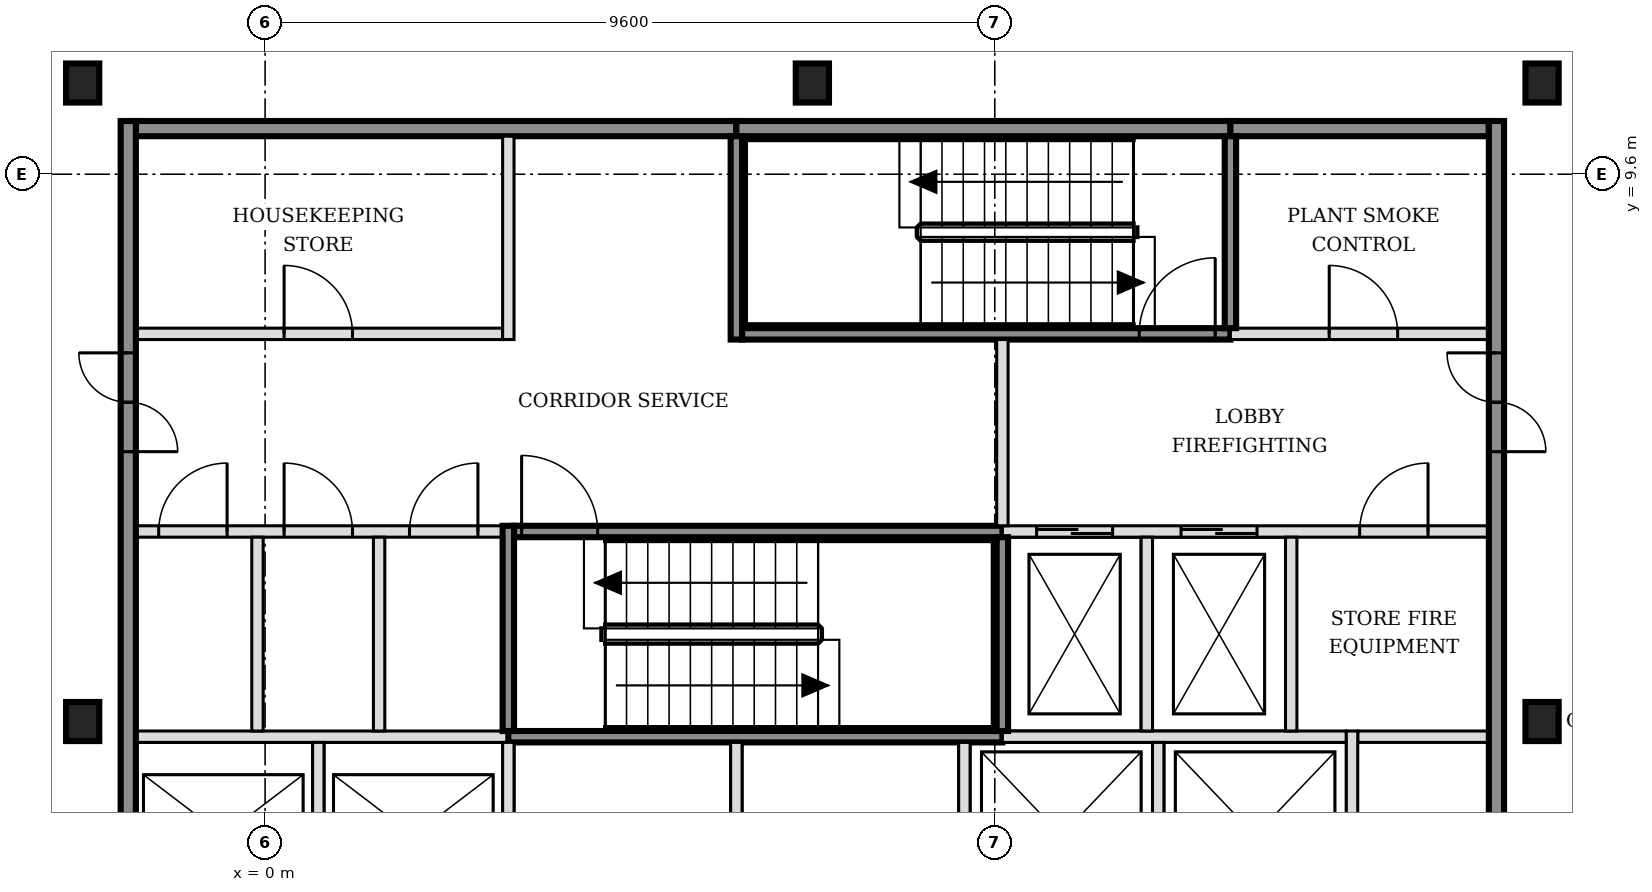
"""IFC4 building model, lengths in metres.
Left out: names, types, materials, properties, quantities, classifications, styles, units other than length and angle.
Written with IfcOpenShell. Run it as: python <this file> out.ifc"""

import sys

from ifc_helpers import new_model, si_unit, direction, frame, frame_2d, origin, origin_2d, place, context, subcontext, project, spatial, rectangle, i_section, extrude, element, fill, save


model = new_model("IFC4")
c1 = context("Model", 3, precision=1e-05, world=origin(), true_north=direction((0.0, 1.0)))
c2 = subcontext(c1, "Body", "Model", "MODEL_VIEW")
j1 = project(units=[si_unit("LENGTHUNIT", "METRE"), si_unit("PLANEANGLEUNIT", "RADIAN")], contexts=[c1])
p1 = place(None, origin())
s1 = spatial("IfcSite", under=j1, at=p1, CompositionType="ELEMENT")
p2 = place(p1, origin())
s2 = spatial("IfcBuilding", under=s1, at=p2, CompositionType="ELEMENT")
p3 = place(p2, frame((0.0, 0.0, 90.6)))
s3 = spatial("IfcBuildingStorey", under=s2, at=p3, CompositionType="ELEMENT", Elevation=90.6)
for number, where, z_axis, x_axis in (
    (1, (-2.4, 2.4, -0.15), (0.0, 0.0, 1.0), (1.0, 0.0, 0.0)),
    (2, (16.8, 2.4, -0.15), (0.0, 0.0, 1.0), (1.0, 0.0, 0.0)),
    (3, (-2.4, 10.8, -0.15), (0.0, 0.0, 1.0), (1.0, 0.0, 0.0)),
    (4, (7.2, 10.8, -0.15), (0.0, 0.0, 1.0), (1.0, 0.0, 0.0)),
    (5, (16.8, 10.8, -0.15), (0.0, 0.0, 1.0), (1.0, 0.0, 0.0)),
):
    element("IfcColumn", number, at=place(p3, frame(where, z_axis=z_axis, x_axis=x_axis)), inside=s3, PredefinedType="COLUMN", context=c2, shape_type="SweptSolid", body=[
        extrude(i_section(OverallWidth=0.437, OverallDepth=0.514, WebThickness=0.061, FlangeThickness=0.097, FilletRadius=0.015, at=origin_2d()), origin(), (0.0, 0.0, 1.0), 3.6),
    ])
p4 = place(p3, frame((-1.7, 2.2, 0.0), z_axis=(0.0, 0.0, 1.0), x_axis=(1.0, 0.0, 0.0)))
e6 = element("IfcWall", 6, at=p4, inside=s3, PredefinedType="SOLIDWALL", context=c2, shape_type="SweptSolid", body=[
    extrude(rectangle(XDim=4.9, YDim=0.15, at=frame_2d((2.45, 0.0))), origin(), (0.0, 0.0, 1.0), 3.45),
])
p5 = place(p3, frame((3.2, 2.2, 0.0), z_axis=(0.0, 0.0, 1.0), x_axis=(1.0, 0.0, 0.0)))
e7 = element("IfcWall", 7, at=p5, inside=s3, PredefinedType="SOLIDWALL", context=c2, shape_type="SweptSolid", body=[
    extrude(rectangle(XDim=6.5, YDim=0.15, at=frame_2d((3.25, 0.0))), origin(), (0.0, 0.0, 1.0), 3.45),
])
p6 = place(p3, frame((9.7, 2.2, 0.0), z_axis=(0.0, 0.0, 1.0), x_axis=(1.0, 0.0, 0.0)))
e8 = element("IfcWall", 8, at=p6, inside=s3, PredefinedType="SOLIDWALL", context=c2, shape_type="SweptSolid", body=[
    extrude(rectangle(XDim=4.525, YDim=0.15, at=frame_2d((2.263, 0.0))), origin(), (0.0, 0.0, 1.0), 3.45),
])
p7 = place(p3, frame((14.375, 2.2, 0.0), z_axis=(0.0, 0.0, 1.0), x_axis=(1.0, 0.0, 0.0)))
e9 = element("IfcWall", 9, at=p7, inside=s3, PredefinedType="PARTITIONING", context=c2, shape_type="SweptSolid", body=[
    extrude(rectangle(XDim=1.725, YDim=0.15, at=frame_2d((0.863, 0.0))), origin(), (0.0, 0.0, 1.0), 3.45),
])
p8 = place(p3, frame((-1.7, 4.9, 0.0), z_axis=(0.0, 0.0, 1.0), x_axis=(1.0, 0.0, 0.0)))
e10 = element("IfcWall", 10, at=p8, inside=s3, PredefinedType="PARTITIONING", context=c2, shape_type="SweptSolid", body=[
    extrude(rectangle(XDim=4.825, YDim=0.15, at=frame_2d((2.413, 0.0))), origin(), (0.0, 0.0, 1.0), 3.45),
])
p9 = place(p8, frame((0.3, 0.0, 0.0)))
e11 = element("IfcOpeningElement", 11, at=p9, cuts=e10, PredefinedType="OPENING", context=c2, shape_type="SweptSolid", body=[
    extrude(rectangle(XDim=0.9, YDim=2.1, at=frame_2d((0.45, 1.05))), frame((0.0, 0.085, 0.0), z_axis=(0.0, -1.0, 0.0), x_axis=(1.0, 0.0, 0.0)), (0.0, 0.0, 1.0), 0.17),
])
p10 = place(p8, frame((1.95, 0.0, 0.0)))
e12 = element("IfcOpeningElement", 12, at=p10, cuts=e10, PredefinedType="OPENING", context=c2, shape_type="SweptSolid", body=[
    extrude(rectangle(XDim=0.9, YDim=2.1, at=frame_2d((0.45, 1.05))), frame((0.0, 0.085, 0.0), z_axis=(0.0, -1.0, 0.0), x_axis=(1.0, 0.0, 0.0)), (0.0, 0.0, 1.0), 0.17),
])
p11 = place(p8, frame((3.6, 0.0, 0.0)))
e13 = element("IfcOpeningElement", 13, at=p11, cuts=e10, PredefinedType="OPENING", context=c2, shape_type="SweptSolid", body=[
    extrude(rectangle(XDim=0.9, YDim=2.1, at=frame_2d((0.45, 1.05))), frame((0.0, 0.085, 0.0), z_axis=(0.0, -1.0, 0.0), x_axis=(1.0, 0.0, 0.0)), (0.0, 0.0, 1.0), 0.17),
])
p12 = place(p3, frame((3.275, 4.9, 0.0), z_axis=(0.0, 0.0, 1.0), x_axis=(1.0, 0.0, 0.0)))
e14 = element("IfcWall", 14, at=p12, inside=s3, PredefinedType="SOLIDWALL", context=c2, shape_type="SweptSolid", body=[
    extrude(rectangle(XDim=6.425, YDim=0.15, at=frame_2d((3.212, 0.0))), origin(), (0.0, 0.0, 1.0), 3.45),
])
p13 = place(p12, frame((0.1, 0.0, 0.0)))
e15 = element("IfcOpeningElement", 15, at=p13, cuts=e14, PredefinedType="OPENING", context=c2, shape_type="SweptSolid", body=[
    extrude(rectangle(XDim=1.0, YDim=2.1, at=frame_2d((0.5, 1.05))), frame((0.0, 0.085, 0.0), z_axis=(0.0, -1.0, 0.0), x_axis=(1.0, 0.0, 0.0)), (0.0, 0.0, 1.0), 0.17),
])
p14 = place(p3, frame((9.7, 4.9, 0.0), z_axis=(0.0, 0.0, 1.0), x_axis=(1.0, 0.0, 0.0)))
e16 = element("IfcWall", 16, at=p14, inside=s3, PredefinedType="SOLIDWALL", context=c2, shape_type="SweptSolid", body=[
    extrude(rectangle(XDim=6.4, YDim=0.15, at=frame_2d((3.2, 0.0))), origin(), (0.0, 0.0, 1.0), 3.45),
])
p15 = place(p14, frame((0.45, 0.0, 0.0)))
e17 = element("IfcOpeningElement", 17, at=p15, cuts=e16, PredefinedType="OPENING", context=c2, shape_type="SweptSolid", body=[
    extrude(rectangle(XDim=1.0, YDim=2.1, at=frame_2d((0.5, 1.05))), frame((0.0, 0.085, 0.0), z_axis=(0.0, -1.0, 0.0), x_axis=(1.0, 0.0, 0.0)), (0.0, 0.0, 1.0), 0.17),
])
p16 = place(p14, frame((2.35, 0.0, 0.0)))
e18 = element("IfcOpeningElement", 18, at=p16, cuts=e16, PredefinedType="OPENING", context=c2, shape_type="SweptSolid", body=[
    extrude(rectangle(XDim=1.0, YDim=2.1, at=frame_2d((0.5, 1.05))), frame((0.0, 0.085, 0.0), z_axis=(0.0, -1.0, 0.0), x_axis=(1.0, 0.0, 0.0)), (0.0, 0.0, 1.0), 0.17),
])
p17 = place(p14, frame((4.7, 0.0, 0.0)))
e19 = element("IfcOpeningElement", 19, at=p17, cuts=e16, PredefinedType="OPENING", context=c2, shape_type="SweptSolid", body=[
    extrude(rectangle(XDim=0.9, YDim=2.1, at=frame_2d((0.45, 1.05))), frame((0.0, 0.085, 0.0), z_axis=(0.0, -1.0, 0.0), x_axis=(1.0, 0.0, 0.0)), (0.0, 0.0, 1.0), 0.17),
])
p18 = place(p3, frame((-1.7, 7.5, 0.0), z_axis=(0.0, 0.0, 1.0), x_axis=(1.0, 0.0, 0.0)))
e20 = element("IfcWall", 20, at=p18, inside=s3, PredefinedType="PARTITIONING", context=c2, shape_type="SweptSolid", body=[
    extrude(rectangle(XDim=4.825, YDim=0.15, at=frame_2d((2.413, 0.0))), origin(), (0.0, 0.0, 1.0), 3.45),
])
p19 = place(p18, frame((1.95, 0.0, 0.0)))
e21 = element("IfcOpeningElement", 21, at=p19, cuts=e20, PredefinedType="OPENING", context=c2, shape_type="SweptSolid", body=[
    extrude(rectangle(XDim=0.9, YDim=2.1, at=frame_2d((0.45, 1.05))), frame((0.0, 0.085, 0.0), z_axis=(0.0, -1.0, 0.0), x_axis=(1.0, 0.0, 0.0)), (0.0, 0.0, 1.0), 0.17),
])
p20 = place(p3, frame((6.275, 7.5, 0.0), z_axis=(0.0, 0.0, 1.0), x_axis=(1.0, 0.0, 0.0)))
e22 = element("IfcWall", 22, at=p20, inside=s3, PredefinedType="SOLIDWALL", context=c2, shape_type="SweptSolid", body=[
    extrude(rectangle(XDim=6.425, YDim=0.15, at=frame_2d((3.212, 0.0))), origin(), (0.0, 0.0, 1.0), 3.45),
])
p21 = place(p20, frame((5.225, 0.0, 0.0)))
e23 = element("IfcOpeningElement", 23, at=p21, cuts=e22, PredefinedType="OPENING", context=c2, shape_type="SweptSolid", body=[
    extrude(rectangle(XDim=1.0, YDim=2.1, at=frame_2d((0.5, 1.05))), frame((0.0, 0.085, 0.0), z_axis=(0.0, -1.0, 0.0), x_axis=(1.0, 0.0, 0.0)), (0.0, 0.0, 1.0), 0.17),
])
p22 = place(p3, frame((12.7, 7.5, 0.0), z_axis=(0.0, 0.0, 1.0), x_axis=(1.0, 0.0, 0.0)))
e24 = element("IfcWall", 24, at=p22, inside=s3, PredefinedType="SOLIDWALL", context=c2, shape_type="SweptSolid", body=[
    extrude(rectangle(XDim=3.4, YDim=0.15, at=frame_2d((1.7, 0.0))), origin(), (0.0, 0.0, 1.0), 3.45),
])
p23 = place(p22, frame((1.3, 0.0, 0.0)))
e25 = element("IfcOpeningElement", 25, at=p23, cuts=e24, PredefinedType="OPENING", context=c2, shape_type="SweptSolid", body=[
    extrude(rectangle(XDim=0.9, YDim=2.1, at=frame_2d((0.45, 1.05))), frame((0.0, 0.085, 0.0), z_axis=(0.0, -1.0, 0.0), x_axis=(1.0, 0.0, 0.0)), (0.0, 0.0, 1.0), 0.17),
])
p24 = place(p3, frame((-1.7, 10.2, 0.0), z_axis=(0.0, 0.0, 1.0), x_axis=(1.0, 0.0, 0.0)))
e26 = element("IfcWall", 26, at=p24, inside=s3, PredefinedType="SOLIDWALL", context=c2, shape_type="SweptSolid", body=[
    extrude(rectangle(XDim=7.9, YDim=0.2, at=frame_2d((3.95, 0.0))), origin(), (0.0, 0.0, 1.0), 3.45),
])
p25 = place(p3, frame((6.2, 10.2, 0.0), z_axis=(0.0, 0.0, 1.0), x_axis=(1.0, 0.0, 0.0)))
e27 = element("IfcWall", 27, at=p25, inside=s3, PredefinedType="SOLIDWALL", context=c2, shape_type="SweptSolid", body=[
    extrude(rectangle(XDim=6.5, YDim=0.2, at=frame_2d((3.25, 0.0))), origin(), (0.0, 0.0, 1.0), 3.45),
])
p26 = place(p3, frame((12.7, 10.2, 0.0), z_axis=(0.0, 0.0, 1.0), x_axis=(1.0, 0.0, 0.0)))
e28 = element("IfcWall", 28, at=p26, inside=s3, PredefinedType="SOLIDWALL", context=c2, shape_type="SweptSolid", body=[
    extrude(rectangle(XDim=3.4, YDim=0.2, at=frame_2d((1.7, 0.0))), origin(), (0.0, 0.0, 1.0), 3.45),
])
p27 = place(p3, frame((-1.8, -5.5, 0.0), z_axis=(0.0, 0.0, 1.0), x_axis=(0.0, 1.0, 0.0)))
e29 = element("IfcWall", 29, at=p27, inside=s3, PredefinedType="SOLIDWALL", context=c2, shape_type="SweptSolid", body=[
    extrude(rectangle(XDim=15.8, YDim=0.2, at=frame_2d((7.9, 0.0))), origin(), (0.0, 0.0, 1.0), 3.45),
])
p28 = place(p27, frame((3.05, 0.0, 0.0)))
e30 = element("IfcOpeningElement", 30, at=p28, cuts=e29, PredefinedType="OPENING", context=c2, shape_type="SweptSolid", body=[
    extrude(rectangle(XDim=1.3, YDim=2.1, at=frame_2d((0.65, 1.05))), frame((0.0, 0.11, 0.0), z_axis=(0.0, -1.0, 0.0), x_axis=(1.0, 0.0, 0.0)), (0.0, 0.0, 1.0), 0.22),
])
p29 = place(p27, frame((11.45, 0.0, 0.0)))
e31 = element("IfcOpeningElement", 31, at=p29, cuts=e29, PredefinedType="OPENING", context=c2, shape_type="SweptSolid", body=[
    extrude(rectangle(XDim=1.3, YDim=2.1, at=frame_2d((0.65, 1.05))), frame((0.0, 0.11, 0.0), z_axis=(0.0, -1.0, 0.0), x_axis=(1.0, 0.0, 0.0)), (0.0, 0.0, 1.0), 0.22),
])
p30 = place(p3, frame((-0.1, 2.275, 0.0), z_axis=(0.0, 0.0, 1.0), x_axis=(0.0, 1.0, 0.0)))
e32 = element("IfcWall", 32, at=p30, inside=s3, PredefinedType="PARTITIONING", context=c2, shape_type="SweptSolid", body=[
    extrude(rectangle(XDim=2.55, YDim=0.15, at=frame_2d((1.275, 0.0))), origin(), (0.0, 0.0, 1.0), 3.45),
])
p31 = place(p3, frame((0.7, -0.325, 0.0), z_axis=(0.0, 0.0, 1.0), x_axis=(0.0, 1.0, 0.0)))
e33 = element("IfcWall", 33, at=p31, inside=s3, PredefinedType="SOLIDWALL", context=c2, shape_type="SweptSolid", body=[
    extrude(rectangle(XDim=2.45, YDim=0.15, at=frame_2d((1.225, 0.0))), origin(), (0.0, 0.0, 1.0), 3.45),
])
p32 = place(p3, frame((1.5, 2.275, 0.0), z_axis=(0.0, 0.0, 1.0), x_axis=(0.0, 1.0, 0.0)))
e34 = element("IfcWall", 34, at=p32, inside=s3, PredefinedType="PARTITIONING", context=c2, shape_type="SweptSolid", body=[
    extrude(rectangle(XDim=2.55, YDim=0.15, at=frame_2d((1.275, 0.0))), origin(), (0.0, 0.0, 1.0), 3.45),
])
p33 = place(p3, frame((3.2, -0.325, 0.0), z_axis=(0.0, 0.0, 1.0), x_axis=(0.0, 1.0, 0.0)))
e35 = element("IfcWall", 35, at=p33, inside=s3, PredefinedType="SOLIDWALL", context=c2, shape_type="SweptSolid", body=[
    extrude(rectangle(XDim=2.45, YDim=0.15, at=frame_2d((1.225, 0.0))), origin(), (0.0, 0.0, 1.0), 3.45),
])
p34 = place(p3, frame((3.2, 2.275, 0.0), z_axis=(0.0, 0.0, 1.0), x_axis=(0.0, 1.0, 0.0)))
e36 = element("IfcWall", 36, at=p34, inside=s3, PredefinedType="SOLIDWALL", context=c2, shape_type="SweptSolid", body=[
    extrude(rectangle(XDim=2.7, YDim=0.15, at=frame_2d((1.35, 0.0))), origin(), (0.0, 0.0, 1.0), 3.45),
])
p35 = place(p3, frame((3.2, 7.425, 0.0), z_axis=(0.0, 0.0, 1.0), x_axis=(0.0, 1.0, 0.0)))
e37 = element("IfcWall", 37, at=p35, inside=s3, PredefinedType="PARTITIONING", context=c2, shape_type="SweptSolid", body=[
    extrude(rectangle(XDim=2.675, YDim=0.15, at=frame_2d((1.337, 0.0))), origin(), (0.0, 0.0, 1.0), 3.45),
])
p36 = place(p3, frame((6.2, -0.325, 0.0), z_axis=(0.0, 0.0, 1.0), x_axis=(0.0, 1.0, 0.0)))
e38 = element("IfcWall", 38, at=p36, inside=s3, PredefinedType="SOLIDWALL", context=c2, shape_type="SweptSolid", body=[
    extrude(rectangle(XDim=2.45, YDim=0.15, at=frame_2d((1.225, 0.0))), origin(), (0.0, 0.0, 1.0), 3.45),
])
p37 = place(p3, frame((6.2, 7.425, 0.0), z_axis=(0.0, 0.0, 1.0), x_axis=(0.0, 1.0, 0.0)))
e39 = element("IfcWall", 39, at=p37, inside=s3, PredefinedType="SOLIDWALL", context=c2, shape_type="SweptSolid", body=[
    extrude(rectangle(XDim=2.675, YDim=0.15, at=frame_2d((1.337, 0.0))), origin(), (0.0, 0.0, 1.0), 3.45),
])
p38 = place(p3, frame((9.2, -0.325, 0.0), z_axis=(0.0, 0.0, 1.0), x_axis=(0.0, 1.0, 0.0)))
e40 = element("IfcWall", 40, at=p38, inside=s3, PredefinedType="SOLIDWALL", context=c2, shape_type="SweptSolid", body=[
    extrude(rectangle(XDim=2.45, YDim=0.15, at=frame_2d((1.225, 0.0))), origin(), (0.0, 0.0, 1.0), 3.45),
])
p39 = place(p3, frame((9.7, 2.275, 0.0), z_axis=(0.0, 0.0, 1.0), x_axis=(0.0, 1.0, 0.0)))
e41 = element("IfcWall", 41, at=p39, inside=s3, PredefinedType="SOLIDWALL", context=c2, shape_type="SweptSolid", body=[
    extrude(rectangle(XDim=2.55, YDim=0.15, at=frame_2d((1.275, 0.0))), origin(), (0.0, 0.0, 1.0), 3.45),
])
p40 = place(p3, frame((9.7, 4.975, 0.0), z_axis=(0.0, 0.0, 1.0), x_axis=(0.0, 1.0, 0.0)))
e42 = element("IfcWall", 42, at=p40, inside=s3, PredefinedType="SOLIDWALL", context=c2, shape_type="SweptSolid", body=[
    extrude(rectangle(XDim=2.45, YDim=0.15, at=frame_2d((1.225, 0.0))), origin(), (0.0, 0.0, 1.0), 3.45),
])
p41 = place(p3, frame((11.6, 2.275, 0.0), z_axis=(0.0, 0.0, 1.0), x_axis=(0.0, 1.0, 0.0)))
e43 = element("IfcWall", 43, at=p41, inside=s3, PredefinedType="SOLIDWALL", context=c2, shape_type="SweptSolid", body=[
    extrude(rectangle(XDim=2.55, YDim=0.15, at=frame_2d((1.275, 0.0))), origin(), (0.0, 0.0, 1.0), 3.45),
])
p42 = place(p3, frame((11.75, -0.325, 0.0), z_axis=(0.0, 0.0, 1.0), x_axis=(0.0, 1.0, 0.0)))
e44 = element("IfcWall", 44, at=p42, inside=s3, PredefinedType="SOLIDWALL", context=c2, shape_type="SweptSolid", body=[
    extrude(rectangle(XDim=2.45, YDim=0.15, at=frame_2d((1.225, 0.0))), origin(), (0.0, 0.0, 1.0), 3.45),
])
p43 = place(p3, frame((12.7, 7.575, 0.0), z_axis=(0.0, 0.0, 1.0), x_axis=(0.0, 1.0, 0.0)))
e45 = element("IfcWall", 45, at=p43, inside=s3, PredefinedType="SOLIDWALL", context=c2, shape_type="SweptSolid", body=[
    extrude(rectangle(XDim=2.525, YDim=0.15, at=frame_2d((1.263, 0.0))), origin(), (0.0, 0.0, 1.0), 3.45),
])
p44 = place(p3, frame((13.5, 2.275, 0.0), z_axis=(0.0, 0.0, 1.0), x_axis=(0.0, 1.0, 0.0)))
e46 = element("IfcWall", 46, at=p44, inside=s3, PredefinedType="SOLIDWALL", context=c2, shape_type="SweptSolid", body=[
    extrude(rectangle(XDim=2.55, YDim=0.15, at=frame_2d((1.275, 0.0))), origin(), (0.0, 0.0, 1.0), 3.45),
])
p45 = place(p3, frame((14.3, -0.475, 0.0), z_axis=(0.0, 0.0, 1.0), x_axis=(0.0, 1.0, 0.0)))
e47 = element("IfcWall", 47, at=p45, inside=s3, PredefinedType="SOLIDWALL", context=c2, shape_type="SweptSolid", body=[
    extrude(rectangle(XDim=2.75, YDim=0.15, at=frame_2d((1.375, 0.0))), origin(), (0.0, 0.0, 1.0), 3.45),
])
p46 = place(p3, frame((16.2, -5.5, 0.0), z_axis=(0.0, 0.0, 1.0), x_axis=(0.0, 1.0, 0.0)))
e48 = element("IfcWall", 48, at=p46, inside=s3, PredefinedType="SOLIDWALL", context=c2, shape_type="SweptSolid", body=[
    extrude(rectangle(XDim=15.8, YDim=0.2, at=frame_2d((7.9, 0.0))), origin(), (0.0, 0.0, 1.0), 3.45),
])
p47 = place(p46, frame((3.05, 0.0, 0.0)))
e49 = element("IfcOpeningElement", 49, at=p47, cuts=e48, PredefinedType="OPENING", context=c2, shape_type="SweptSolid", body=[
    extrude(rectangle(XDim=1.3, YDim=2.1, at=frame_2d((0.65, 1.05))), frame((0.0, 0.11, 0.0), z_axis=(0.0, -1.0, 0.0), x_axis=(1.0, 0.0, 0.0)), (0.0, 0.0, 1.0), 0.22),
])
p48 = place(p46, frame((11.45, 0.0, 0.0)))
e50 = element("IfcOpeningElement", 50, at=p48, cuts=e48, PredefinedType="OPENING", context=c2, shape_type="SweptSolid", body=[
    extrude(rectangle(XDim=1.3, YDim=2.1, at=frame_2d((0.65, 1.05))), frame((0.0, 0.11, 0.0), z_axis=(0.0, -1.0, 0.0), x_axis=(1.0, 0.0, 0.0)), (0.0, 0.0, 1.0), 0.22),
])
p49 = place(p15, origin())
e51 = element("IfcDoor", 51, at=p49, inside=s3, OperationType="DOUBLE_DOOR_SLIDING", PredefinedType="DOOR", context=c2, shape_type="SweptSolid", body=[
    extrude(rectangle(XDim=1.0, YDim=2.1, at=frame_2d((0.5, 1.05))), frame((0.0, 0.025, 0.0), z_axis=(0.0, -1.0, 0.0), x_axis=(1.0, 0.0, 0.0)), (0.0, 0.0, 1.0), 0.05),
])
fill(e17, e51)
p50 = place(p16, origin())
e52 = element("IfcDoor", 52, at=p50, inside=s3, OperationType="DOUBLE_DOOR_SLIDING", PredefinedType="DOOR", context=c2, shape_type="SweptSolid", body=[
    extrude(rectangle(XDim=1.0, YDim=2.1, at=frame_2d((0.5, 1.05))), frame((0.0, 0.025, 0.0), z_axis=(0.0, -1.0, 0.0), x_axis=(1.0, 0.0, 0.0)), (0.0, 0.0, 1.0), 0.05),
])
fill(e18, e52)
p51 = place(p13, origin())
e53 = element("IfcDoor", 53, at=p51, inside=s3, OperationType="SINGLE_SWING_LEFT", PredefinedType="DOOR", context=c2, shape_type="SweptSolid", body=[
    extrude(rectangle(XDim=1.0, YDim=2.1, at=frame_2d((0.5, 1.05))), frame((0.0, 0.025, 0.0), z_axis=(0.0, -1.0, 0.0), x_axis=(1.0, 0.0, 0.0)), (0.0, 0.0, 1.0), 0.05),
])
fill(e15, e53)
p52 = place(p21, origin())
e54 = element("IfcDoor", 54, at=p52, inside=s3, OperationType="SINGLE_SWING_RIGHT", PredefinedType="DOOR", context=c2, shape_type="SweptSolid", body=[
    extrude(rectangle(XDim=1.0, YDim=2.1, at=frame_2d((0.5, 1.05))), frame((0.0, 0.025, 0.0), z_axis=(0.0, -1.0, 0.0), x_axis=(1.0, 0.0, 0.0)), (0.0, 0.0, 1.0), 0.05),
])
fill(e23, e54)
p53 = place(p29, origin())
e55 = element("IfcDoor", 55, at=p53, inside=s3, OperationType="DOUBLE_DOOR_SINGLE_SWING", PredefinedType="DOOR", context=c2, shape_type="SweptSolid", body=[
    extrude(rectangle(XDim=1.3, YDim=2.1, at=frame_2d((0.65, 1.05))), frame((0.0, 0.025, 0.0), z_axis=(0.0, -1.0, 0.0), x_axis=(1.0, 0.0, 0.0)), (0.0, 0.0, 1.0), 0.05),
])
fill(e31, e55)
p54 = place(p48, origin())
e56 = element("IfcDoor", 56, at=p54, inside=s3, OperationType="DOUBLE_DOOR_SINGLE_SWING", PredefinedType="DOOR", context=c2, shape_type="SweptSolid", body=[
    extrude(rectangle(XDim=1.3, YDim=2.1, at=frame_2d((0.65, 1.05))), frame((0.0, 0.025, 0.0), z_axis=(0.0, -1.0, 0.0), x_axis=(1.0, 0.0, 0.0)), (0.0, 0.0, 1.0), 0.05),
])
fill(e50, e56)
p55 = place(p17, origin())
e57 = element("IfcDoor", 57, at=p55, inside=s3, OperationType="SINGLE_SWING_RIGHT", PredefinedType="DOOR", context=c2, shape_type="SweptSolid", body=[
    extrude(rectangle(XDim=0.9, YDim=2.1, at=frame_2d((0.45, 1.05))), frame((0.0, 0.025, 0.0), z_axis=(0.0, -1.0, 0.0), x_axis=(1.0, 0.0, 0.0)), (0.0, 0.0, 1.0), 0.05),
])
fill(e19, e57)
p56 = place(p23, origin())
e58 = element("IfcDoor", 58, at=p56, inside=s3, OperationType="SINGLE_SWING_LEFT", PredefinedType="DOOR", context=c2, shape_type="SweptSolid", body=[
    extrude(rectangle(XDim=0.9, YDim=2.1, at=frame_2d((0.45, 1.05))), frame((0.0, 0.025, 0.0), z_axis=(0.0, -1.0, 0.0), x_axis=(1.0, 0.0, 0.0)), (0.0, 0.0, 1.0), 0.05),
])
fill(e25, e58)
p57 = place(p9, origin())
e59 = element("IfcDoor", 59, at=p57, inside=s3, OperationType="SINGLE_SWING_RIGHT", PredefinedType="DOOR", context=c2, shape_type="SweptSolid", body=[
    extrude(rectangle(XDim=0.9, YDim=2.1, at=frame_2d((0.45, 1.05))), frame((0.0, 0.025, 0.0), z_axis=(0.0, -1.0, 0.0), x_axis=(1.0, 0.0, 0.0)), (0.0, 0.0, 1.0), 0.05),
])
fill(e11, e59)
p58 = place(p10, origin())
e60 = element("IfcDoor", 60, at=p58, inside=s3, OperationType="SINGLE_SWING_LEFT", PredefinedType="DOOR", context=c2, shape_type="SweptSolid", body=[
    extrude(rectangle(XDim=0.9, YDim=2.1, at=frame_2d((0.45, 1.05))), frame((0.0, 0.025, 0.0), z_axis=(0.0, -1.0, 0.0), x_axis=(1.0, 0.0, 0.0)), (0.0, 0.0, 1.0), 0.05),
])
fill(e12, e60)
p59 = place(p11, origin())
e61 = element("IfcDoor", 61, at=p59, inside=s3, OperationType="SINGLE_SWING_RIGHT", PredefinedType="DOOR", context=c2, shape_type="SweptSolid", body=[
    extrude(rectangle(XDim=0.9, YDim=2.1, at=frame_2d((0.45, 1.05))), frame((0.0, 0.025, 0.0), z_axis=(0.0, -1.0, 0.0), x_axis=(1.0, 0.0, 0.0)), (0.0, 0.0, 1.0), 0.05),
])
fill(e13, e61)
p60 = place(p19, origin())
e62 = element("IfcDoor", 62, at=p60, inside=s3, OperationType="SINGLE_SWING_LEFT", PredefinedType="DOOR", context=c2, shape_type="SweptSolid", body=[
    extrude(rectangle(XDim=0.9, YDim=2.1, at=frame_2d((0.45, 1.05))), frame((0.0, 0.025, 0.0), z_axis=(0.0, -1.0, 0.0), x_axis=(1.0, 0.0, 0.0)), (0.0, 0.0, 1.0), 0.05),
])
fill(e21, e62)
save(model, sys.argv[1])
